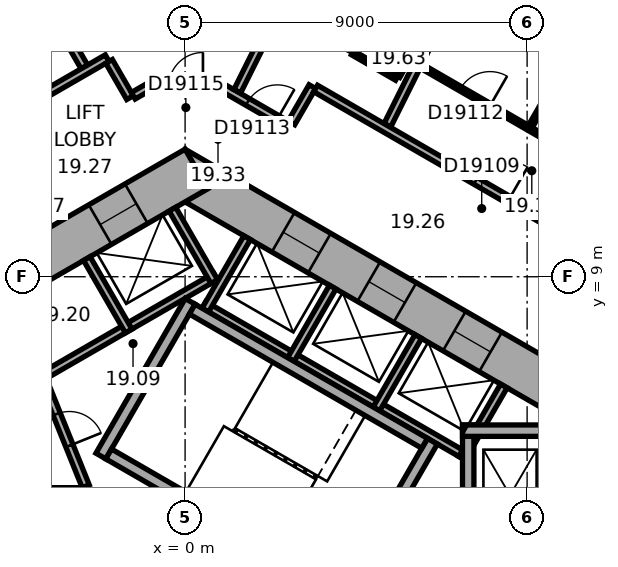
"""IFC4 building model, lengths in metres.
Left out: names, types, materials, properties, quantities, classifications, styles, units other than length and angle.
Written with IfcOpenShell. Run it as: python <this file> out.ifc"""

import sys

from ifc_helpers import new_model, si_unit, direction, frame, frame_2d, origin, place, context, subcontext, project, spatial, rectangle, extrude, element, fill, save


model = new_model("IFC4")
c1 = context("Model", 3, precision=1e-05, world=origin(), true_north=direction((0.0, 1.0)))
c2 = subcontext(c1, "Body", "Model", "MODEL_VIEW")
j1 = project(units=[si_unit("LENGTHUNIT", "METRE"), si_unit("PLANEANGLEUNIT", "RADIAN")], contexts=[c1])
p1 = place(None, origin())
s1 = spatial("IfcSite", under=j1, at=p1, CompositionType="ELEMENT")
p2 = place(p1, origin())
s2 = spatial("IfcBuilding", under=s1, at=p2, CompositionType="ELEMENT")
p3 = place(p2, frame((0.0, 0.0, 86.9)))
s3 = spatial("IfcBuildingStorey", under=s2, at=p3, CompositionType="ELEMENT", Elevation=86.9)
p4 = place(p3, frame((10.4, 5.658, 0.0), z_axis=(0.0, 0.0, 1.0), x_axis=(-0.866021384402, 0.500006961711, 0.0)))
e1 = element("IfcWall", 1, at=p4, inside=s3, PredefinedType="SHEAR", context=c2, shape_type="SweptSolid", body=[
    extrude(rectangle(XDim=12.355, YDim=1.2, at=frame_2d((6.178, 0.0))), origin(), (0.0, 0.0, 1.0), 3.3),
])
p5 = place(p4, frame((2.728, 0.0, 0.0)))
e2 = element("IfcOpeningElement", 2, at=p5, cuts=e1, PredefinedType="OPENING", context=c2, shape_type="SweptSolid", body=[
    extrude(rectangle(XDim=1.1, YDim=2.1, at=frame_2d((0.55, 1.05))), frame((0.0, 0.61, 0.0), z_axis=(0.0, -1.0, 0.0), x_axis=(1.0, 0.0, 0.0)), (0.0, 0.0, 1.0), 1.22),
])
p6 = place(p4, frame((5.328, 0.0, 0.0)))
e3 = element("IfcOpeningElement", 3, at=p6, cuts=e1, PredefinedType="OPENING", context=c2, shape_type="SweptSolid", body=[
    extrude(rectangle(XDim=1.1, YDim=2.1, at=frame_2d((0.55, 1.05))), frame((0.0, 0.61, 0.0), z_axis=(0.0, -1.0, 0.0), x_axis=(1.0, 0.0, 0.0)), (0.0, 0.0, 1.0), 1.22),
])
p7 = place(p4, frame((7.928, 0.0, 0.0)))
e4 = element("IfcOpeningElement", 4, at=p7, cuts=e1, PredefinedType="OPENING", context=c2, shape_type="SweptSolid", body=[
    extrude(rectangle(XDim=1.1, YDim=2.1, at=frame_2d((0.55, 1.05))), frame((0.0, 0.61, 0.0), z_axis=(0.0, -1.0, 0.0), x_axis=(1.0, 0.0, 0.0)), (0.0, 0.0, 1.0), 1.22),
])
p8 = place(p3, frame((0.3, 11.836, 0.0), z_axis=(0.0, 0.0, 1.0), x_axis=(-0.866021384402, -0.500006961711, 0.0)))
e5 = element("IfcWall", 5, at=p8, inside=s3, PredefinedType="SHEAR", context=c2, shape_type="SweptSolid", body=[
    extrude(rectangle(XDim=12.355, YDim=1.2, at=frame_2d((6.178, 0.0))), origin(), (0.0, 0.0, 1.0), 3.3),
])
p9 = place(p8, frame((6.378, 0.0, 0.0)))
e6 = element("IfcOpeningElement", 6, at=p9, cuts=e5, PredefinedType="OPENING", context=c2, shape_type="SweptSolid", body=[
    extrude(rectangle(XDim=1.5, YDim=2.1, at=frame_2d((0.75, 1.05))), frame((0.0, 0.61, 0.0), z_axis=(0.0, -1.0, 0.0), x_axis=(1.0, 0.0, 0.0)), (0.0, 0.0, 1.0), 1.22),
])
p10 = place(p8, frame((1.828, 0.0, 0.0)))
e7 = element("IfcOpeningElement", 7, at=p10, cuts=e5, PredefinedType="OPENING", context=c2, shape_type="SweptSolid", body=[
    extrude(rectangle(XDim=1.1, YDim=2.1, at=frame_2d((0.55, 1.05))), frame((0.0, 0.61, 0.0), z_axis=(0.0, -1.0, 0.0), x_axis=(1.0, 0.0, 0.0)), (0.0, 0.0, 1.0), 1.22),
])
p11 = place(p3, frame((-3.136, 24.805, 0.0), z_axis=(0.0, 0.0, 1.0), x_axis=(-0.866028291626, -0.499994998079, 0.0)))
e8 = element("IfcWall", 8, at=p11, inside=s3, PredefinedType="STANDARD", context=c2, shape_type="SweptSolid", body=[
    extrude(rectangle(XDim=21.246, YDim=0.2, at=frame_2d((10.623, 0.0))), origin(), (0.0, 0.0, 1.0), 3.3),
])
p12 = place(p11, frame((1.555, 0.0, 0.8)))
e9 = element("IfcOpeningElement", 9, at=p12, cuts=e8, PredefinedType="OPENING", context=c2, shape_type="SweptSolid", body=[
    extrude(rectangle(XDim=2.4, YDim=1.7, at=frame_2d((1.2, 0.85))), frame((0.0, 0.11, 0.0), z_axis=(0.0, -1.0, 0.0), x_axis=(1.0, 0.0, 0.0)), (0.0, 0.0, 1.0), 0.22),
])
p13 = place(p11, frame((5.489, 0.0, 0.8)))
e10 = element("IfcOpeningElement", 10, at=p13, cuts=e8, PredefinedType="OPENING", context=c2, shape_type="SweptSolid", body=[
    extrude(rectangle(XDim=2.4, YDim=1.7, at=frame_2d((1.2, 0.85))), frame((0.0, 0.11, 0.0), z_axis=(0.0, -1.0, 0.0), x_axis=(1.0, 0.0, 0.0)), (0.0, 0.0, 1.0), 0.22),
])
p14 = place(p11, frame((9.424, 0.0, 0.8)))
e11 = element("IfcOpeningElement", 11, at=p14, cuts=e8, PredefinedType="OPENING", context=c2, shape_type="SweptSolid", body=[
    extrude(rectangle(XDim=2.4, YDim=1.7, at=frame_2d((1.2, 0.85))), frame((0.0, 0.11, 0.0), z_axis=(0.0, -1.0, 0.0), x_axis=(1.0, 0.0, 0.0)), (0.0, 0.0, 1.0), 0.22),
])
p15 = place(p11, frame((13.358, 0.0, 0.8)))
e12 = element("IfcOpeningElement", 12, at=p15, cuts=e8, PredefinedType="OPENING", context=c2, shape_type="SweptSolid", body=[
    extrude(rectangle(XDim=2.4, YDim=1.7, at=frame_2d((1.2, 0.85))), frame((0.0, 0.11, 0.0), z_axis=(0.0, -1.0, 0.0), x_axis=(1.0, 0.0, 0.0)), (0.0, 0.0, 1.0), 0.22),
])
p16 = place(p11, frame((17.293, 0.0, 0.8)))
e13 = element("IfcOpeningElement", 13, at=p16, cuts=e8, PredefinedType="OPENING", context=c2, shape_type="SweptSolid", body=[
    extrude(rectangle(XDim=2.4, YDim=1.7, at=frame_2d((1.2, 0.85))), frame((0.0, 0.11, 0.0), z_axis=(0.0, -1.0, 0.0), x_axis=(1.0, 0.0, 0.0)), (0.0, 0.0, 1.0), 0.22),
])
p17 = place(p3, frame((7.424, 4.259, 0.0), z_axis=(0.0, 0.0, 1.0), x_axis=(-0.866026010844, 0.49999894854, 0.0)))
e14 = element("IfcWall", 14, at=p17, inside=s3, PredefinedType="PARTITIONING", context=c2, shape_type="SweptSolid", body=[
    extrude(rectangle(XDim=8.0, YDim=0.2, at=frame_2d((4.0, 0.0))), origin(), (0.0, 0.0, 1.0), 3.05),
])
for number, where, z_axis, x_axis in (
    (15, (7.287, 4.222, 0.0), (0.0, 0.0, 1.0), (0.5, 0.866, 0.0)),
    (16, (5.036, 5.522, 0.0), (0.0, 0.0, 1.0), (0.5, 0.866, 0.0)),
    (17, (2.784, 6.822, 0.0), (0.0, 0.0, 1.0), (0.5, 0.866, 0.0)),
    (18, (0.532, 8.122, 0.0), (0.0, 0.0, 1.0), (0.5, 0.866, 0.0)),
):
    element("IfcWall", number, at=place(p3, frame(where, z_axis=z_axis, x_axis=x_axis)), inside=s3, PredefinedType="PARTITIONING", context=c2, shape_type="SweptSolid", body=[
        extrude(rectangle(XDim=2.2, YDim=0.2, at=frame_2d((1.1, 0.0))), origin(), (0.0, 0.0, 1.0), 3.05),
    ])
p18 = place(p3, frame((0.803, 9.009, 0.0), z_axis=(0.0, 0.0, 1.0), x_axis=(-0.866028230842, -0.499995103361, 0.0)))
e19 = element("IfcWall", 19, at=p18, inside=s3, PredefinedType="PARTITIONING", context=c2, shape_type="SweptSolid", body=[
    extrude(rectangle(XDim=5.4, YDim=0.2, at=frame_2d((2.7, 0.0))), origin(), (0.0, 0.0, 1.0), 3.05),
])
p19 = place(p3, frame((0.767, 8.872, 0.0), z_axis=(0.0, 0.0, 1.0), x_axis=(-0.499994660107, 0.866028486751, 0.0)))
e20 = element("IfcWall", 20, at=p19, inside=s3, PredefinedType="PARTITIONING", context=c2, shape_type="SweptSolid", body=[
    extrude(rectangle(XDim=2.2, YDim=0.2, at=frame_2d((1.1, 0.0))), origin(), (0.0, 0.0, 1.0), 3.05),
])
p20 = place(p3, frame((-1.485, 7.572, 0.0), z_axis=(0.0, 0.0, 1.0), x_axis=(-0.50002983664, 0.866008176907, 0.0)))
e21 = element("IfcWall", 21, at=p20, inside=s3, PredefinedType="PARTITIONING", context=c2, shape_type="SweptSolid", body=[
    extrude(rectangle(XDim=2.2, YDim=0.2, at=frame_2d((1.1, 0.0))), origin(), (0.0, 0.0, 1.0), 3.05),
])
p21 = place(p3, frame((4.158, 0.602, 0.0), z_axis=(0.0, 0.0, 1.0), x_axis=(0.499977259774, 0.866038532462, 0.0)))
e22 = element("IfcWall", 22, at=p21, inside=s3, PredefinedType="SHEAR", context=c2, shape_type="SweptSolid", body=[
    extrude(rectangle(XDim=4.7, YDim=0.3, at=frame_2d((2.35, 0.0))), origin(), (0.0, 0.0, 1.0), 3.05),
])
p22 = place(p21, frame((0.8, 0.0, 0.0)))
e23 = element("IfcOpeningElement", 23, at=p22, cuts=e22, PredefinedType="OPENING", context=c2, shape_type="SweptSolid", body=[
    extrude(rectangle(XDim=1.2, YDim=2.1, at=frame_2d((0.6, 1.05))), frame((0.0, 0.16, 0.0), z_axis=(0.0, -1.0, 0.0), x_axis=(1.0, 0.0, 0.0)), (0.0, 0.0, 1.0), 0.32),
])
p23 = place(p3, frame((-2.216, 4.282, 0.0), z_axis=(0.0, 0.0, 1.0), x_axis=(0.499977259774, 0.866038532462, 0.0)))
e24 = element("IfcWall", 24, at=p23, inside=s3, PredefinedType="SHEAR", context=c2, shape_type="SweptSolid", body=[
    extrude(rectangle(XDim=4.7, YDim=0.3, at=frame_2d((2.35, 0.0))), origin(), (0.0, 0.0, 1.0), 3.05),
])
for number, where, z_axis, x_axis in (
    (25, (4.103, 0.807, 0.0), (0.0, 0.0, 1.0), (-0.866, 0.5, 0.0)),
    (26, (6.303, 4.617, 0.0), (0.0, 0.0, 1.0), (-0.866, 0.5, 0.0)),
):
    element("IfcWall", number, at=place(p3, frame(where, z_axis=z_axis, x_axis=x_axis)), inside=s3, PredefinedType="SHEAR", context=c2, shape_type="SweptSolid", body=[
        extrude(rectangle(XDim=7.06, YDim=0.3, at=frame_2d((3.53, 0.0))), origin(), (0.0, 0.0, 1.0), 3.05),
    ])
p24 = place(p3, frame((-2.6, 3.3, 0.0), z_axis=(0.0, 0.0, 1.0), x_axis=(-1.0, 0.0, 0.0)))
e27 = element("IfcWall", 27, at=p24, inside=s3, PredefinedType="SHEAR", context=c2, shape_type="SweptSolid", body=[
    extrude(rectangle(XDim=4.7, YDim=0.3, at=frame_2d((2.35, 0.0))), origin(), (0.0, 0.0, 1.0), 3.05),
])
p25 = place(p24, frame((0.8, 0.0, 0.0)))
e28 = element("IfcOpeningElement", 28, at=p25, cuts=e27, PredefinedType="OPENING", context=c2, shape_type="SweptSolid", body=[
    extrude(rectangle(XDim=1.2, YDim=2.1, at=frame_2d((0.6, 1.05))), frame((0.0, 0.16, 0.0), z_axis=(0.0, -1.0, 0.0), x_axis=(1.0, 0.0, 0.0)), (0.0, 0.0, 1.0), 0.32),
])
p26 = place(p3, frame((7.45, 1.75, 0.0), z_axis=(0.0, 0.0, 1.0), x_axis=(0.0, 1.0, 0.0)))
e29 = element("IfcWall", 29, at=p26, inside=s3, PredefinedType="SHEAR", context=c2, shape_type="SweptSolid", body=[
    extrude(rectangle(XDim=3.35, YDim=0.3, at=frame_2d((1.675, 0.0))), origin(), (0.0, 0.0, 1.0), 3.05),
])
p27 = place(p3, frame((7.3, 4.95, 0.0), z_axis=(0.0, 0.0, 1.0), x_axis=(1.0, 0.0, 0.0)))
e30 = element("IfcWall", 30, at=p27, inside=s3, PredefinedType="SHEAR", context=c2, shape_type="SweptSolid", body=[
    extrude(rectangle(XDim=2.2, YDim=0.3, at=frame_2d((1.1, 0.0))), origin(), (0.0, 0.0, 1.0), 3.05),
])
p28 = place(p3, frame((-2.615, 3.487, 0.0), z_axis=(0.0, 0.0, 1.0), x_axis=(-0.373576831041, 0.92759924068, 0.0)))
e31 = element("IfcWall", 31, at=p28, inside=s3, PredefinedType="PARTITIONING", context=c2, shape_type="SweptSolid", body=[
    extrude(rectangle(XDim=3.002, YDim=0.2, at=frame_2d((1.501, 0.0))), origin(), (0.0, 0.0, 1.0), 3.05),
])
p29 = place(p28, frame((1.15, 0.0, 0.0)))
e32 = element("IfcOpeningElement", 32, at=p29, cuts=e31, PredefinedType="OPENING", context=c2, shape_type="SweptSolid", body=[
    extrude(rectangle(XDim=0.9, YDim=2.1, at=frame_2d((0.45, 1.05))), frame((0.0, 0.11, 0.0), z_axis=(0.0, -1.0, 0.0), x_axis=(1.0, 0.0, 0.0)), (0.0, 0.0, 1.0), 0.22),
])
p30 = place(p3, frame((-6.676, 21.492, 0.0), z_axis=(0.0, 0.0, 1.0), x_axis=(0.500011263043, -0.866018900966, 0.0)))
e33 = element("IfcWall", 33, at=p30, inside=s3, PredefinedType="PARTITIONING", context=c2, shape_type="SweptSolid", body=[
    extrude(rectangle(XDim=8.049, YDim=0.2, at=frame_2d((4.024, 0.0))), origin(), (0.0, 0.0, 1.0), 3.05),
])
p31 = place(p3, frame((-2.05, 14.752, 0.0), z_axis=(0.0, 0.0, 1.0), x_axis=(-0.866030936828, -0.499990416364, 0.0)))
e34 = element("IfcWall", 34, at=p31, inside=s3, PredefinedType="PARTITIONING", context=c2, shape_type="SweptSolid", body=[
    extrude(rectangle(XDim=3.102, YDim=0.2, at=frame_2d((1.551, 0.0))), origin(), (0.0, 0.0, 1.0), 3.05),
])
p32 = place(p3, frame((-1.449, 13.712, 0.0), z_axis=(0.0, 0.0, 1.0), x_axis=(-0.499978356969, 0.866037899034, 0.0)))
e35 = element("IfcWall", 35, at=p32, inside=s3, PredefinedType="PARTITIONING", context=c2, shape_type="SweptSolid", body=[
    extrude(rectangle(XDim=1.101, YDim=0.2, at=frame_2d((0.551, 0.0))), origin(), (0.0, 0.0, 1.0), 3.05),
])
p33 = place(p3, frame((-0.95, 14.001, 0.0), z_axis=(0.0, 0.0, 1.0), x_axis=(-0.86609177584, -0.499885022602, 0.0)))
e36 = element("IfcWall", 36, at=p33, inside=s3, PredefinedType="PARTITIONING", context=c2, shape_type="SweptSolid", body=[
    extrude(rectangle(XDim=0.477, YDim=0.2, at=frame_2d((0.238, 0.0))), origin(), (0.0, 0.0, 1.0), 3.05),
])
p34 = place(p3, frame((0.95, 14.001, 0.0), z_axis=(0.0, 0.0, 1.0), x_axis=(-1.0, 0.0, 0.0)))
e37 = element("IfcWall", 37, at=p34, inside=s3, PredefinedType="PARTITIONING", context=c2, shape_type="SweptSolid", body=[
    extrude(rectangle(XDim=1.86, YDim=0.2, at=frame_2d((0.93, 0.0))), origin(), (0.0, 0.0, 1.0), 3.05),
])
p35 = place(p34, frame((0.48, 0.0, 0.0)))
e38 = element("IfcOpeningElement", 38, at=p35, cuts=e37, PredefinedType="OPENING", context=c2, shape_type="SweptSolid", body=[
    extrude(rectangle(XDim=0.9, YDim=2.1, at=frame_2d((0.45, 1.05))), frame((0.0, 0.11, 0.0), z_axis=(0.0, -1.0, 0.0), x_axis=(1.0, 0.0, 0.0)), (0.0, 0.0, 1.0), 0.22),
])
p36 = place(p3, frame((2.748, 12.962, 0.0), z_axis=(0.0, 0.0, 1.0), x_axis=(-0.866013897511, 0.50001992892, 0.0)))
e39 = element("IfcWall", 39, at=p36, inside=s3, PredefinedType="PARTITIONING", context=c2, shape_type="SweptSolid", body=[
    extrude(rectangle(XDim=2.037, YDim=0.2, at=frame_2d((1.018, 0.0))), origin(), (0.0, 0.0, 1.0), 3.05),
])
p37 = place(p36, frame((0.372, 0.0, 0.0)))
e40 = element("IfcOpeningElement", 40, at=p37, cuts=e39, PredefinedType="OPENING", context=c2, shape_type="SweptSolid", body=[
    extrude(rectangle(XDim=0.9, YDim=2.1, at=frame_2d((0.45, 1.05))), frame((0.0, 0.11, 0.0), z_axis=(0.0, -1.0, 0.0), x_axis=(1.0, 0.0, 0.0)), (0.0, 0.0, 1.0), 0.22),
])
p38 = place(p3, frame((3.349, 14.002, 0.0), z_axis=(0.0, 0.0, 1.0), x_axis=(-0.500074377092, -0.865982457891, 0.0)))
e41 = element("IfcWall", 41, at=p38, inside=s3, PredefinedType="PARTITIONING", context=c2, shape_type="SweptSolid", body=[
    extrude(rectangle(XDim=1.101, YDim=0.2, at=frame_2d((0.55, 0.0))), origin(), (0.0, 0.0, 1.0), 3.05),
])
p39 = place(p3, frame((4.356, 14.922, 0.0), z_axis=(0.0, 0.0, 1.0), x_axis=(0.499936506574, 0.866062058628, 0.0)))
e42 = element("IfcWall", 42, at=p39, inside=s3, PredefinedType="PARTITIONING", context=c2, shape_type="SweptSolid", body=[
    extrude(rectangle(XDim=2.6, YDim=0.12, at=frame_2d((1.3, 0.0))), origin(), (0.0, 0.0, 1.0), 3.05),
])
p40 = place(p39, frame((0.85, 0.0, 0.0)))
e43 = element("IfcOpeningElement", 43, at=p40, cuts=e42, PredefinedType="OPENING", context=c2, shape_type="SweptSolid", body=[
    extrude(rectangle(XDim=0.9, YDim=2.1, at=frame_2d((0.45, 1.05))), frame((0.0, 0.07, 0.0), z_axis=(0.0, -1.0, 0.0), x_axis=(1.0, 0.0, 0.0)), (0.0, 0.0, 1.0), 0.14),
])
p41 = place(p3, frame((5.351, 21.859, 0.0), z_axis=(0.0, 0.0, 1.0), x_axis=(-0.446205309328, -0.894930624086, 0.0)))
e44 = element("IfcWall", 44, at=p41, inside=s3, PredefinedType="PARTITIONING", context=c2, shape_type="SweptSolid", body=[
    extrude(rectangle(XDim=8.913, YDim=0.2, at=frame_2d((4.457, 0.0))), origin(), (0.0, 0.0, 1.0), 2.6),
])
p42 = place(p3, frame((5.569, 14.222, 0.0), z_axis=(0.0, 0.0, 1.0), x_axis=(-0.866036909293, 0.499980071345, 0.0)))
e45 = element("IfcWall", 45, at=p42, inside=s3, PredefinedType="PARTITIONING", context=c2, shape_type="SweptSolid", body=[
    extrude(rectangle(XDim=1.34, YDim=0.12, at=frame_2d((0.67, 0.0))), origin(), (0.0, 0.0, 1.0), 3.05),
])
p43 = place(p3, frame((6.839, 16.422, 0.0), z_axis=(0.0, 0.0, 1.0), x_axis=(-0.50000366821, -0.866023285932, 0.0)))
e46 = element("IfcWall", 46, at=p43, inside=s3, PredefinedType="PARTITIONING", context=c2, shape_type="SweptSolid", body=[
    extrude(rectangle(XDim=2.48, YDim=0.12, at=frame_2d((1.24, 0.0))), origin(), (0.0, 0.0, 1.0), 3.05),
])
p44 = place(p3, frame((8.872, 20.104, 0.0), z_axis=(0.0, 0.0, 1.0), x_axis=(-0.446218378653, -0.894924107706, 0.0)))
e47 = element("IfcWall", 47, at=p44, inside=s3, PredefinedType="PARTITIONING", context=c2, shape_type="SweptSolid", body=[
    extrude(rectangle(XDim=7.95, YDim=0.2, at=frame_2d((3.975, 0.0))), origin(), (0.0, 0.0, 1.0), 3.05),
])
p45 = place(p3, frame((10.885, 9.652, 0.0), z_axis=(0.0, 0.0, 1.0), x_axis=(-0.866033868542, 0.499985338323, 0.0)))
e48 = element("IfcWall", 48, at=p45, inside=s3, PredefinedType="PARTITIONING", context=c2, shape_type="SweptSolid", body=[
    extrude(rectangle(XDim=8.602, YDim=0.2, at=frame_2d((4.301, 0.0))), origin(), (0.0, 0.0, 1.0), 3.05),
])
p46 = place(p45, frame((2.739, 0.0, 0.0)))
e49 = element("IfcOpeningElement", 49, at=p46, cuts=e48, PredefinedType="OPENING", context=c2, shape_type="SweptSolid", body=[
    extrude(rectangle(XDim=1.0, YDim=2.1, at=frame_2d((0.5, 1.05))), frame((0.0, 0.11, 0.0), z_axis=(0.0, -1.0, 0.0), x_axis=(1.0, 0.0, 0.0)), (0.0, 0.0, 1.0), 0.22),
])
p47 = place(p3, frame((12.243, 18.423, 0.0), z_axis=(0.0, 0.0, 1.0), x_axis=(-0.499993523031, -0.866029143232, 0.0)))
e50 = element("IfcWall", 50, at=p47, inside=s3, PredefinedType="PARTITIONING", context=c2, shape_type="SweptSolid", body=[
    extrude(rectangle(XDim=6.315, YDim=0.12, at=frame_2d((3.157, 0.0))), origin(), (0.0, 0.0, 1.0), 2.6),
])
p48 = place(p3, frame((12.866, 10.702, 0.0), z_axis=(0.0, 0.0, 1.0), x_axis=(-0.866023151433, 0.500003901167, 0.0)))
e51 = element("IfcWall", 51, at=p48, inside=s3, PredefinedType="PARTITIONING", context=c2, shape_type="SweptSolid", body=[
    extrude(rectangle(XDim=7.684, YDim=0.12, at=frame_2d((3.842, 0.0))), origin(), (0.0, 0.0, 1.0), 3.05),
])
p49 = place(p48, frame((0.55, 0.0, 0.0)))
e52 = element("IfcOpeningElement", 52, at=p49, cuts=e51, PredefinedType="OPENING", context=c2, shape_type="SweptSolid", body=[
    extrude(rectangle(XDim=1.0, YDim=2.1, at=frame_2d((0.5, 1.05))), frame((0.0, 0.07, 0.0), z_axis=(0.0, -1.0, 0.0), x_axis=(1.0, 0.0, 0.0)), (0.0, 0.0, 1.0), 0.14),
])
p50 = place(p48, frame((2.8, 0.0, 0.0)))
e53 = element("IfcOpeningElement", 53, at=p50, cuts=e51, PredefinedType="OPENING", context=c2, shape_type="SweptSolid", body=[
    extrude(rectangle(XDim=0.9, YDim=2.1, at=frame_2d((0.45, 1.05))), frame((0.0, 0.07, 0.0), z_axis=(0.0, -1.0, 0.0), x_axis=(1.0, 0.0, 0.0)), (0.0, 0.0, 1.0), 0.14),
])
p51 = place(p48, frame((5.592, 0.0, 0.0)))
e54 = element("IfcOpeningElement", 54, at=p51, cuts=e51, PredefinedType="OPENING", context=c2, shape_type="SweptSolid", body=[
    extrude(rectangle(XDim=0.9, YDim=2.1, at=frame_2d((0.45, 1.05))), frame((0.0, 0.07, 0.0), z_axis=(0.0, -1.0, 0.0), x_axis=(1.0, 0.0, 0.0)), (0.0, 0.0, 1.0), 0.14),
])
p52 = place(p29, origin())
e55 = element("IfcDoor", 55, at=p52, inside=s3, OperationType="SINGLE_SWING_LEFT", PredefinedType="DOOR", context=c2, shape_type="SweptSolid", body=[
    extrude(rectangle(XDim=0.9, YDim=2.1, at=frame_2d((0.45, 1.05))), frame((0.0, 0.025, 0.0), z_axis=(0.0, -1.0, 0.0), x_axis=(1.0, 0.0, 0.0)), (0.0, 0.0, 1.0), 0.05),
])
fill(e32, e55)
p53 = place(p5, origin())
e56 = element("IfcDoor", 56, at=p53, inside=s3, OperationType="DOUBLE_DOOR_SLIDING", PredefinedType="DOOR", context=c2, shape_type="SweptSolid", body=[
    extrude(rectangle(XDim=1.1, YDim=2.1, at=frame_2d((0.55, 1.05))), frame((0.0, 0.025, 0.0), z_axis=(0.0, -1.0, 0.0), x_axis=(1.0, 0.0, 0.0)), (0.0, 0.0, 1.0), 0.05),
])
fill(e2, e56)
p54 = place(p6, origin())
e57 = element("IfcDoor", 57, at=p54, inside=s3, OperationType="DOUBLE_DOOR_SLIDING", PredefinedType="DOOR", context=c2, shape_type="SweptSolid", body=[
    extrude(rectangle(XDim=1.1, YDim=2.1, at=frame_2d((0.55, 1.05))), frame((0.0, 0.025, 0.0), z_axis=(0.0, -1.0, 0.0), x_axis=(1.0, 0.0, 0.0)), (0.0, 0.0, 1.0), 0.05),
])
fill(e3, e57)
p55 = place(p7, origin())
e58 = element("IfcDoor", 58, at=p55, inside=s3, OperationType="DOUBLE_DOOR_SLIDING", PredefinedType="DOOR", context=c2, shape_type="SweptSolid", body=[
    extrude(rectangle(XDim=1.1, YDim=2.1, at=frame_2d((0.55, 1.05))), frame((0.0, 0.025, 0.0), z_axis=(0.0, -1.0, 0.0), x_axis=(1.0, 0.0, 0.0)), (0.0, 0.0, 1.0), 0.05),
])
fill(e4, e58)
p56 = place(p10, origin())
e59 = element("IfcDoor", 59, at=p56, inside=s3, OperationType="DOUBLE_DOOR_SLIDING", PredefinedType="DOOR", context=c2, shape_type="SweptSolid", body=[
    extrude(rectangle(XDim=1.1, YDim=2.1, at=frame_2d((0.55, 1.05))), frame((0.0, 0.025, 0.0), z_axis=(0.0, -1.0, 0.0), x_axis=(1.0, 0.0, 0.0)), (0.0, 0.0, 1.0), 0.05),
])
fill(e7, e59)
p57 = place(p46, origin())
e60 = element("IfcDoor", 60, at=p57, inside=s3, OperationType="SINGLE_SWING_LEFT", PredefinedType="DOOR", context=c2, shape_type="SweptSolid", body=[
    extrude(rectangle(XDim=1.0, YDim=2.1, at=frame_2d((0.5, 1.05))), frame((0.0, 0.025, 0.0), z_axis=(0.0, -1.0, 0.0), x_axis=(1.0, 0.0, 0.0)), (0.0, 0.0, 1.0), 0.05),
])
fill(e49, e60)
p58 = place(p51, origin())
e61 = element("IfcDoor", 61, at=p58, inside=s3, OperationType="SINGLE_SWING_LEFT", PredefinedType="DOOR", context=c2, shape_type="SweptSolid", body=[
    extrude(rectangle(XDim=0.9, YDim=2.1, at=frame_2d((0.45, 1.05))), frame((0.0, 0.025, 0.0), z_axis=(0.0, -1.0, 0.0), x_axis=(1.0, 0.0, 0.0)), (0.0, 0.0, 1.0), 0.05),
])
fill(e54, e61)
p59 = place(p37, origin())
e62 = element("IfcDoor", 62, at=p59, inside=s3, OperationType="SINGLE_SWING_LEFT", PredefinedType="DOOR", context=c2, shape_type="SweptSolid", body=[
    extrude(rectangle(XDim=0.9, YDim=2.1, at=frame_2d((0.45, 1.05))), frame((0.0, 0.025, 0.0), z_axis=(0.0, -1.0, 0.0), x_axis=(1.0, 0.0, 0.0)), (0.0, 0.0, 1.0), 0.05),
])
fill(e40, e62)
p60 = place(p35, origin())
e63 = element("IfcDoor", 63, at=p60, inside=s3, OperationType="SINGLE_SWING_LEFT", PredefinedType="DOOR", context=c2, shape_type="SweptSolid", body=[
    extrude(rectangle(XDim=0.9, YDim=2.1, at=frame_2d((0.45, 1.05))), frame((0.0, 0.025, 0.0), z_axis=(0.0, -1.0, 0.0), x_axis=(1.0, 0.0, 0.0)), (0.0, 0.0, 1.0), 0.05),
])
fill(e38, e63)
save(model, sys.argv[1])
